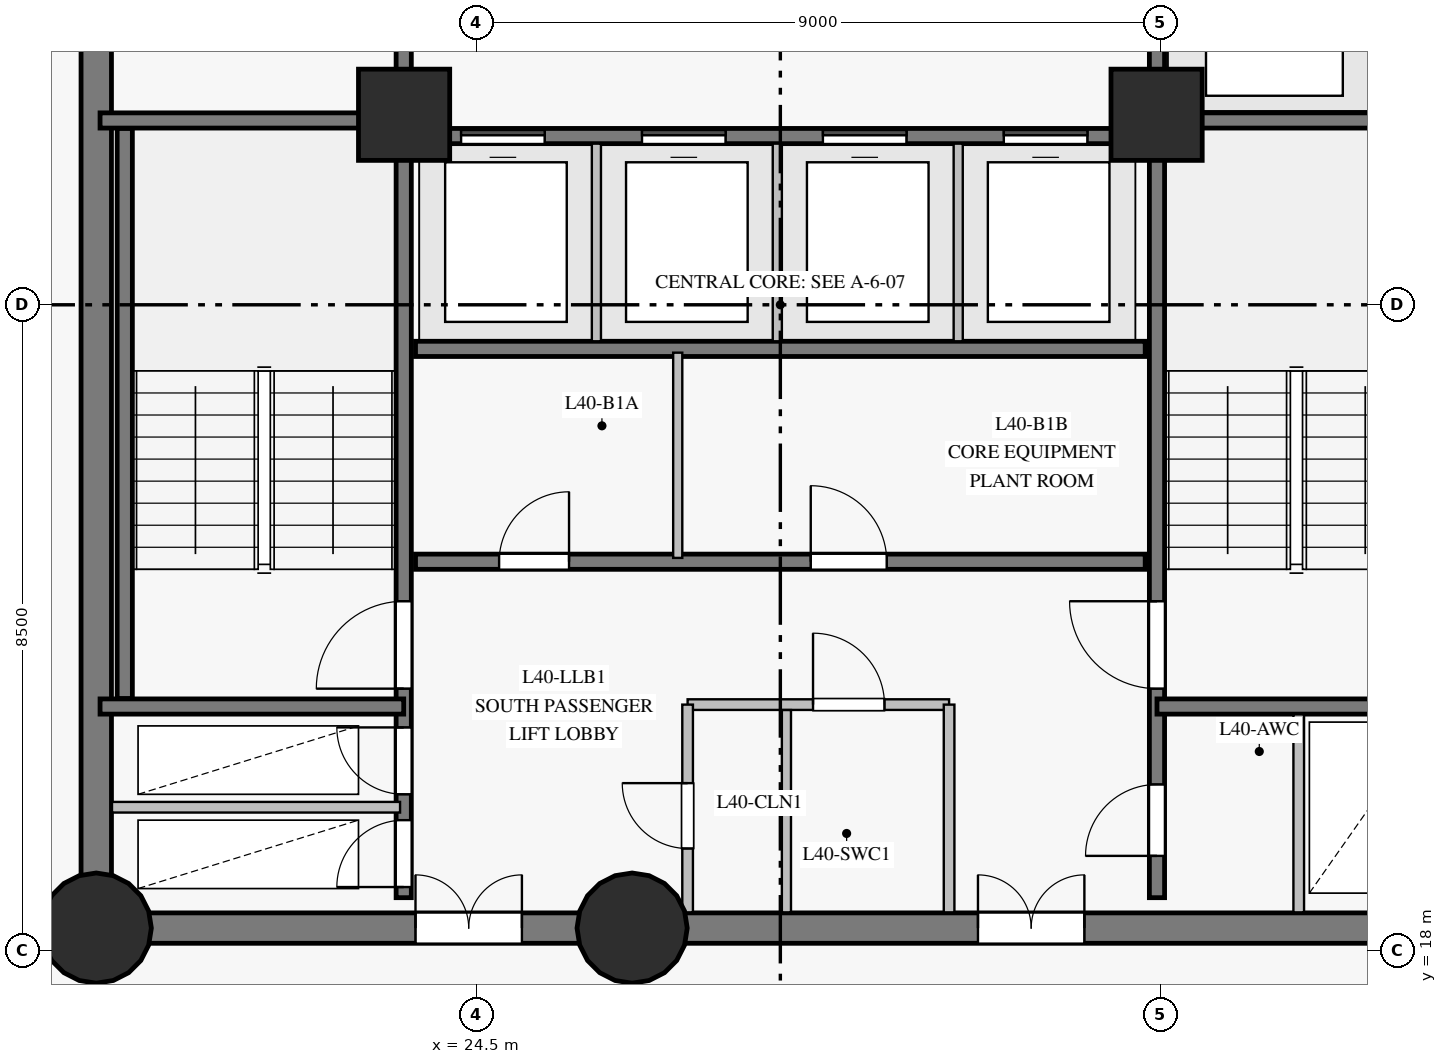
"""IFC4 building model, lengths in metres.
Left out: names, types, materials, properties, quantities, classifications, styles, units other than length and angle.
Written with IfcOpenShell. Run it as: python <this file> out.ifc"""

import sys

from ifc_helpers import new_model, si_unit, direction, frame, frame_2d, origin, origin_with_axes, origin_2d, place, context, subcontext, project, spatial, rectangle, circle, extrude, source, transform, mapped, element, fill, save


model = new_model("IFC4")
c1 = context("Model", 3, precision=1e-05, world=origin(), true_north=direction((0.0, 1.0)))
c2 = subcontext(c1, "Body", "Model", "MODEL_VIEW")
j1 = project(units=[si_unit("LENGTHUNIT", "METRE"), si_unit("PLANEANGLEUNIT", "RADIAN")], contexts=[c1])
p1 = place(None, origin())
s1 = spatial("IfcSite", under=j1, at=p1, CompositionType="ELEMENT")
p2 = place(p1, origin())
s2 = spatial("IfcBuilding", under=s1, at=p2, CompositionType="ELEMENT")
p3 = place(p2, frame((0.0, 0.0, 141.95)))
s3 = spatial("IfcBuildingStorey", under=s2, at=p3, CompositionType="ELEMENT", Elevation=141.95)
p4 = place(p3, frame((19.5, 18.3, 0.0), z_axis=(0.0, 0.0, 1.0), x_axis=(1.0, 0.0, 0.0)))
e1 = element("IfcWall", 1, at=p4, inside=s3, PredefinedType="SHEAR", context=c2, shape_type="SweptSolid", body=[
    extrude(rectangle(XDim=7.05, YDim=0.4, at=frame_2d((3.525, 0.0))), origin(), (0.0, 0.0, 1.0), 2.825),
])
p5 = place(p4, frame((4.2, 0.0, 0.0)))
e2 = element("IfcOpeningElement", 2, at=p5, cuts=e1, PredefinedType="OPENING", context=c2, shape_type="SweptSolid", body=[
    extrude(rectangle(XDim=1.4, YDim=2.2, at=frame_2d((0.7, 1.1))), frame((0.0, 0.21, 0.0), z_axis=(0.0, -1.0, 0.0), x_axis=(1.0, 0.0, 0.0)), (0.0, 0.0, 1.0), 0.42),
])
p6 = place(p3, frame((26.55, 18.3, 0.0), z_axis=(0.0, 0.0, 1.0), x_axis=(1.0, 0.0, 0.0)))
e3 = element("IfcWall", 3, at=p6, inside=s3, PredefinedType="SHEAR", context=c2, shape_type="SweptSolid", body=[
    extrude(rectangle(XDim=10.95, YDim=0.4, at=frame_2d((5.475, 0.0))), origin(), (0.0, 0.0, 1.0), 2.825),
])
p7 = place(p6, frame((4.55, 0.0, 0.0)))
e4 = element("IfcOpeningElement", 4, at=p7, cuts=e3, PredefinedType="OPENING", context=c2, shape_type="SweptSolid", body=[
    extrude(rectangle(XDim=1.4, YDim=2.2, at=frame_2d((0.7, 1.1))), frame((0.0, 0.21, 0.0), z_axis=(0.0, -1.0, 0.0), x_axis=(1.0, 0.0, 0.0)), (0.0, 0.0, 1.0), 0.42),
])
p8 = place(p3, frame((19.5, 34.7, 0.0), z_axis=(0.0, 0.0, 1.0), x_axis=(0.0, -1.0, 0.0)))
e5 = element("IfcWall", 5, at=p8, inside=s3, PredefinedType="SHEAR", context=c2, shape_type="SweptSolid", body=[
    extrude(rectangle(XDim=16.4, YDim=0.4, at=frame_2d((8.2, 0.0))), origin(), (0.0, 0.0, 1.0), 2.825),
])
p9 = place(p8, frame((3.1, 0.0, 0.0)))
e6 = element("IfcOpeningElement", 6, at=p9, cuts=e5, PredefinedType="OPENING", context=c2, shape_type="SweptSolid", body=[
    extrude(rectangle(XDim=1.1, YDim=2.15, at=frame_2d((0.55, 1.075))), frame((0.0, 0.21, 0.0), z_axis=(0.0, -1.0, 0.0), x_axis=(1.0, 0.0, 0.0)), (0.0, 0.0, 1.0), 0.42),
])
m1 = source(origin_with_axes(), c2, "Body", "SweptSolid", [
    extrude(circle(Radius=0.725, at=origin_2d()), origin(), (0.0, 0.0, 1.0), 3.05),
])
for number, where, z_axis, x_axis in (
    (7, (19.5, 18.3, 0.0), (0.0, 0.0, 1.0), (1.0, 0.0, 0.0)),
    (8, (26.55, 18.3, 0.0), (0.0, 0.0, 1.0), (1.0, 0.0, 0.0)),
):
    element("IfcColumn", number, at=place(p3, frame(where, z_axis=z_axis, x_axis=x_axis)), inside=s3, PredefinedType="COLUMN", context=c2, shape_type="MappedRepresentation", body=[
        mapped(m1, transform((0.0, 0.0, 0.0), scale=1.0)),
    ])
m2 = source(origin_with_axes(), c2, "Body", "SweptSolid", [
    extrude(rectangle(XDim=1.2, YDim=1.2, at=origin_2d()), origin(), (0.0, 0.0, 1.0), 3.05),
])
for number, where, z_axis, x_axis in (
    (9, (23.55, 29.0, 0.0), (0.0, 0.0, 1.0), (1.0, 0.0, 0.0)),
    (10, (33.45, 29.0, 0.0), (0.0, 0.0, 1.0), (1.0, 0.0, 0.0)),
):
    element("IfcColumn", number, at=place(p3, frame(where, z_axis=z_axis, x_axis=x_axis)), inside=s3, PredefinedType="COLUMN", context=c2, shape_type="MappedRepresentation", body=[
        mapped(m2, transform((0.0, 0.0, 0.0), scale=1.0)),
    ])
p10 = place(p3, frame((23.545, 18.7, 0.0), z_axis=(0.0, 0.0, 1.0), x_axis=(0.0, 1.0, 0.0)))
e11 = element("IfcWall", 11, at=p10, inside=s3, PredefinedType="SHEAR", context=c2, shape_type="SweptSolid", body=[
    extrude(rectangle(XDim=15.6, YDim=0.2, at=frame_2d((7.8, 0.0))), origin(), (0.0, 0.0, 1.0), 2.825),
])
p11 = place(p10, frame((2.75, 0.0, 0.0)))
e12 = element("IfcOpeningElement", 12, at=p11, cuts=e11, PredefinedType="OPENING", context=c2, shape_type="SweptSolid", body=[
    extrude(rectangle(XDim=1.15, YDim=2.15, at=frame_2d((0.575, 1.075))), frame((0.0, 0.11, 0.0), z_axis=(0.0, -1.0, 0.0), x_axis=(1.0, 0.0, 0.0)), (0.0, 0.0, 1.0), 0.22),
])
p12 = place(p10, frame((0.14, 0.0, 0.0)))
e13 = element("IfcOpeningElement", 13, at=p12, cuts=e11, PredefinedType="OPENING", context=c2, shape_type="SweptSolid", body=[
    extrude(rectangle(XDim=0.88, YDim=2.1, at=frame_2d((0.44, 1.05))), frame((0.0, 0.11, 0.0), z_axis=(0.0, -1.0, 0.0), x_axis=(1.0, 0.0, 0.0)), (0.0, 0.0, 1.0), 0.22),
])
p13 = place(p10, frame((1.36, 0.0, 0.0)))
e14 = element("IfcOpeningElement", 14, at=p13, cuts=e11, PredefinedType="OPENING", context=c2, shape_type="SweptSolid", body=[
    extrude(rectangle(XDim=0.88, YDim=2.1, at=frame_2d((0.44, 1.05))), frame((0.0, 0.11, 0.0), z_axis=(0.0, -1.0, 0.0), x_axis=(1.0, 0.0, 0.0)), (0.0, 0.0, 1.0), 0.22),
])
p14 = place(p10, frame((12.1, 0.0, 0.0)))
e15 = element("IfcOpeningElement", 15, at=p14, cuts=e11, PredefinedType="OPENING", context=c2, shape_type="SweptSolid", body=[
    extrude(rectangle(XDim=1.12, YDim=2.15, at=frame_2d((0.56, 1.075))), frame((0.0, 0.11, 0.0), z_axis=(0.0, -1.0, 0.0), x_axis=(1.0, 0.0, 0.0)), (0.0, 0.0, 1.0), 0.22),
])
p15 = place(p10, frame((14.05, 0.0, 0.0)))
e16 = element("IfcOpeningElement", 16, at=p15, cuts=e11, PredefinedType="OPENING", context=c2, shape_type="SweptSolid", body=[
    extrude(rectangle(XDim=1.12, YDim=2.15, at=frame_2d((0.56, 1.075))), frame((0.0, 0.11, 0.0), z_axis=(0.0, -1.0, 0.0), x_axis=(1.0, 0.0, 0.0)), (0.0, 0.0, 1.0), 0.22),
])
p16 = place(p3, frame((33.455, 18.7, 0.0), z_axis=(0.0, 0.0, 1.0), x_axis=(0.0, 1.0, 0.0)))
e17 = element("IfcWall", 17, at=p16, inside=s3, PredefinedType="SHEAR", context=c2, shape_type="SweptSolid", body=[
    extrude(rectangle(XDim=15.6, YDim=0.2, at=frame_2d((7.8, 0.0))), origin(), (0.0, 0.0, 1.0), 2.825),
])
p17 = place(p16, frame((2.75, 0.0, 0.0)))
e18 = element("IfcOpeningElement", 18, at=p17, cuts=e17, PredefinedType="OPENING", context=c2, shape_type="SweptSolid", body=[
    extrude(rectangle(XDim=1.15, YDim=2.15, at=frame_2d((0.575, 1.075))), frame((0.0, 0.11, 0.0), z_axis=(0.0, -1.0, 0.0), x_axis=(1.0, 0.0, 0.0)), (0.0, 0.0, 1.0), 0.22),
])
p18 = place(p16, frame((0.55, 0.0, 0.0)))
e19 = element("IfcOpeningElement", 19, at=p18, cuts=e17, PredefinedType="OPENING", context=c2, shape_type="SweptSolid", body=[
    extrude(rectangle(XDim=0.94, YDim=2.1, at=frame_2d((0.47, 1.05))), frame((0.0, 0.11, 0.0), z_axis=(0.0, -1.0, 0.0), x_axis=(1.0, 0.0, 0.0)), (0.0, 0.0, 1.0), 0.22),
])
p19 = place(p3, frame((23.7, 23.12, 0.0), z_axis=(0.0, 0.0, 1.0), x_axis=(1.0, 0.0, 0.0)))
e20 = element("IfcWall", 20, at=p19, inside=s3, PredefinedType="SHEAR", context=c2, shape_type="SweptSolid", body=[
    extrude(rectangle(XDim=9.6, YDim=0.2, at=frame_2d((4.8, 0.0))), origin(), (0.0, 0.0, 1.0), 2.825),
])
p20 = place(p19, frame((1.1, 0.0, 0.0)))
e21 = element("IfcOpeningElement", 21, at=p20, cuts=e20, PredefinedType="OPENING", context=c2, shape_type="SweptSolid", body=[
    extrude(rectangle(XDim=0.92, YDim=2.1, at=frame_2d((0.46, 1.05))), frame((0.0, 0.11, 0.0), z_axis=(0.0, -1.0, 0.0), x_axis=(1.0, 0.0, 0.0)), (0.0, 0.0, 1.0), 0.22),
])
p21 = place(p19, frame((5.2, 0.0, 0.0)))
e22 = element("IfcOpeningElement", 22, at=p21, cuts=e20, PredefinedType="OPENING", context=c2, shape_type="SweptSolid", body=[
    extrude(rectangle(XDim=1.0, YDim=2.15, at=frame_2d((0.5, 1.075))), frame((0.0, 0.11, 0.0), z_axis=(0.0, -1.0, 0.0), x_axis=(1.0, 0.0, 0.0)), (0.0, 0.0, 1.0), 0.22),
])
p22 = place(p3, frame((23.7, 25.92, 0.0), z_axis=(0.0, 0.0, 1.0), x_axis=(1.0, 0.0, 0.0)))
e23 = element("IfcWall", 23, at=p22, inside=s3, PredefinedType="SHEAR", context=c2, shape_type="SweptSolid", body=[
    extrude(rectangle(XDim=9.6, YDim=0.2, at=frame_2d((4.8, 0.0))), origin(), (0.0, 0.0, 1.0), 2.825),
])
p23 = place(p3, frame((23.7, 28.72, 0.0), z_axis=(0.0, 0.0, 1.0), x_axis=(1.0, 0.0, 0.0)))
e24 = element("IfcWall", 24, at=p23, inside=s3, PredefinedType="SHEAR", context=c2, shape_type="SweptSolid", body=[
    extrude(rectangle(XDim=9.6, YDim=0.2, at=frame_2d((4.8, 0.0))), origin(), (0.0, 0.0, 1.0), 2.825),
])
p24 = place(p23, frame((0.6, 0.0, 0.0)))
e25 = element("IfcOpeningElement", 25, at=p24, cuts=e24, PredefinedType="OPENING", context=c2, shape_type="SweptSolid", body=[
    extrude(rectangle(XDim=1.1, YDim=2.15, at=frame_2d((0.55, 1.075))), frame((0.0, 0.11, 0.0), z_axis=(0.0, -1.0, 0.0), x_axis=(1.0, 0.0, 0.0)), (0.0, 0.0, 1.0), 0.22),
])
p25 = place(p23, frame((2.98, 0.0, 0.0)))
e26 = element("IfcOpeningElement", 26, at=p25, cuts=e24, PredefinedType="OPENING", context=c2, shape_type="SweptSolid", body=[
    extrude(rectangle(XDim=1.1, YDim=2.15, at=frame_2d((0.55, 1.075))), frame((0.0, 0.11, 0.0), z_axis=(0.0, -1.0, 0.0), x_axis=(1.0, 0.0, 0.0)), (0.0, 0.0, 1.0), 0.22),
])
p26 = place(p23, frame((5.36, 0.0, 0.0)))
e27 = element("IfcOpeningElement", 27, at=p26, cuts=e24, PredefinedType="OPENING", context=c2, shape_type="SweptSolid", body=[
    extrude(rectangle(XDim=1.1, YDim=2.15, at=frame_2d((0.55, 1.075))), frame((0.0, 0.11, 0.0), z_axis=(0.0, -1.0, 0.0), x_axis=(1.0, 0.0, 0.0)), (0.0, 0.0, 1.0), 0.22),
])
p27 = place(p23, frame((7.74, 0.0, 0.0)))
e28 = element("IfcOpeningElement", 28, at=p27, cuts=e24, PredefinedType="OPENING", context=c2, shape_type="SweptSolid", body=[
    extrude(rectangle(XDim=1.1, YDim=2.15, at=frame_2d((0.55, 1.075))), frame((0.0, 0.11, 0.0), z_axis=(0.0, -1.0, 0.0), x_axis=(1.0, 0.0, 0.0)), (0.0, 0.0, 1.0), 0.22),
])
p28 = place(p3, frame((19.875, 21.32, 0.0), z_axis=(0.0, 0.0, 1.0), x_axis=(0.0, 1.0, 0.0)))
e29 = element("IfcWall", 29, at=p28, inside=s3, PredefinedType="SHEAR", context=c2, shape_type="SweptSolid", body=[
    extrude(rectangle(XDim=7.5, YDim=0.2, at=frame_2d((3.75, 0.0))), origin(), (0.0, 0.0, 1.0), 2.825),
])
for number, where, z_axis, x_axis in (
    (30, (33.455, 21.215, 0.0), (0.0, 0.0, 1.0), (1.0, 0.0, 0.0)),
    (31, (33.455, 28.925, 0.0), (0.0, 0.0, 1.0), (1.0, 0.0, 0.0)),
    (32, (19.55, 21.215, 0.0), (0.0, 0.0, 1.0), (1.0, 0.0, 0.0)),
    (33, (19.55, 28.925, 0.0), (0.0, 0.0, 1.0), (1.0, 0.0, 0.0)),
):
    element("IfcWall", number, at=place(p3, frame(where, z_axis=z_axis, x_axis=x_axis)), inside=s3, PredefinedType="SHEAR", context=c2, shape_type="SweptSolid", body=[
        extrude(rectangle(XDim=3.995, YDim=0.2, at=frame_2d((1.998, 0.0))), origin(), (0.0, 0.0, 1.0), 2.825),
    ])
p29 = place(p3, frame((19.707, 19.89, 0.0), z_axis=(0.0, 0.0, 1.0), x_axis=(1.0, 0.0, 0.0)))
e34 = element("IfcWall", 34, at=p29, inside=s3, PredefinedType="PARTITIONING", context=c2, shape_type="SweptSolid", body=[
    extrude(rectangle(XDim=3.79, YDim=0.14, at=frame_2d((1.895, 0.0))), origin(), (0.0, 0.0, 1.0), 2.825),
])
p30 = place(p3, frame((27.28, 21.24, 0.0), z_axis=(0.0, 0.0, 1.0), x_axis=(1.0, 0.0, 0.0)))
e35 = element("IfcWall", 35, at=p30, inside=s3, PredefinedType="PARTITIONING", context=c2, shape_type="SweptSolid", body=[
    extrude(rectangle(XDim=3.44, YDim=0.14, at=frame_2d((1.72, 0.0))), origin(), (0.0, 0.0, 1.0), 2.825),
])
p31 = place(p30, frame((1.65, 0.0, 0.0)))
e36 = element("IfcOpeningElement", 36, at=p31, cuts=e35, PredefinedType="OPENING", context=c2, shape_type="SweptSolid", body=[
    extrude(rectangle(XDim=0.94, YDim=2.1, at=frame_2d((0.47, 1.05))), frame((0.0, 0.08, 0.0), z_axis=(0.0, -1.0, 0.0), x_axis=(1.0, 0.0, 0.0)), (0.0, 0.0, 1.0), 0.16),
])
p32 = place(p3, frame((27.15, 23.17, 0.0), z_axis=(0.0, 0.0, 1.0), x_axis=(0.0, 1.0, 0.0)))
e37 = element("IfcWall", 37, at=p32, inside=s3, PredefinedType="PARTITIONING", context=c2, shape_type="SweptSolid", body=[
    extrude(rectangle(XDim=2.7, YDim=0.12, at=frame_2d((1.35, 0.0))), origin(), (0.0, 0.0, 1.0), 2.825),
])
p33 = place(p3, frame((27.28, 18.507, 0.0), z_axis=(0.0, 0.0, 1.0), x_axis=(0.0, 1.0, 0.0)))
e38 = element("IfcWall", 38, at=p33, inside=s3, PredefinedType="PARTITIONING", context=c2, shape_type="SweptSolid", body=[
    extrude(rectangle(XDim=2.733, YDim=0.14, at=frame_2d((1.366, 0.0))), origin(), (0.0, 0.0, 1.0), 2.825),
])
p34 = place(p33, frame((0.84, 0.0, 0.0)))
e39 = element("IfcOpeningElement", 39, at=p34, cuts=e38, PredefinedType="OPENING", context=c2, shape_type="SweptSolid", body=[
    extrude(rectangle(XDim=0.86, YDim=2.1, at=frame_2d((0.43, 1.05))), frame((0.0, 0.08, 0.0), z_axis=(0.0, -1.0, 0.0), x_axis=(1.0, 0.0, 0.0)), (0.0, 0.0, 1.0), 0.16),
])
p35 = place(p3, frame((30.72, 18.507, 0.0), z_axis=(0.0, 0.0, 1.0), x_axis=(0.0, 1.0, 0.0)))
e40 = element("IfcWall", 40, at=p35, inside=s3, PredefinedType="PARTITIONING", context=c2, shape_type="SweptSolid", body=[
    extrude(rectangle(XDim=2.733, YDim=0.14, at=frame_2d((1.366, 0.0))), origin(), (0.0, 0.0, 1.0), 2.825),
])
for number, where, z_axis, x_axis in (
    (41, (26.08, 26.02, 0.0), (0.0, 0.0, 1.0), (0.0, 1.0, 0.0)),
    (42, (28.46, 26.02, 0.0), (0.0, 0.0, 1.0), (0.0, 1.0, 0.0)),
    (43, (30.84, 26.02, 0.0), (0.0, 0.0, 1.0), (0.0, 1.0, 0.0)),
):
    element("IfcWall", number, at=place(p3, frame(where, z_axis=z_axis, x_axis=x_axis)), inside=s3, PredefinedType="PARTITIONING", context=c2, shape_type="SweptSolid", body=[
        extrude(rectangle(XDim=2.6, YDim=0.12, at=frame_2d((1.3, 0.0))), origin(), (0.0, 0.0, 1.0), 2.825),
    ])
p36 = place(p3, frame((28.58, 18.507, 0.0), z_axis=(0.0, 0.0, 1.0), x_axis=(0.0, 1.0, 0.0)))
e44 = element("IfcWall", 44, at=p36, inside=s3, PredefinedType="PARTITIONING", context=c2, shape_type="SweptSolid", body=[
    extrude(rectangle(XDim=2.662, YDim=0.12, at=frame_2d((1.331, 0.0))), origin(), (0.0, 0.0, 1.0), 2.825),
])
p37 = place(p3, frame((35.32, 18.507, 0.0), z_axis=(0.0, 0.0, 1.0), x_axis=(0.0, 1.0, 0.0)))
e45 = element("IfcWall", 45, at=p37, inside=s3, PredefinedType="PARTITIONING", context=c2, shape_type="SweptSolid", body=[
    extrude(rectangle(XDim=2.604, YDim=0.14, at=frame_2d((1.302, 0.0))), origin(), (0.0, 0.0, 1.0), 2.825),
])
m3 = source(origin_with_axes(), c2, "Body", "SweptSolid", [
    extrude(rectangle(XDim=1.15, YDim=2.15, at=frame_2d((0.575, 1.075))), frame((0.0, 0.025, 0.0), z_axis=(0.0, -1.0, 0.0), x_axis=(1.0, 0.0, 0.0)), (0.0, 0.0, 1.0), 0.05),
])
p38 = place(p11, origin())
e46 = element("IfcDoor", 46, at=p38, inside=s3, OperationType="SINGLE_SWING_LEFT", PredefinedType="DOOR", context=c2, shape_type="MappedRepresentation", body=[
    mapped(m3, transform((0.0, 0.0, 0.0), scale=1.0)),
])
fill(e12, e46)
p39 = place(p17, origin())
e47 = element("IfcDoor", 47, at=p39, inside=s3, OperationType="SINGLE_SWING_RIGHT", PredefinedType="DOOR", context=c2, shape_type="MappedRepresentation", body=[
    mapped(m3, transform((0.0, 0.0, 0.0), scale=1.0)),
])
fill(e18, e47)
m4 = source(origin_with_axes(), c2, "Body", "SweptSolid", [
    extrude(rectangle(XDim=0.88, YDim=2.1, at=frame_2d((0.44, 1.05))), frame((0.0, 0.025, 0.0), z_axis=(0.0, -1.0, 0.0), x_axis=(1.0, 0.0, 0.0)), (0.0, 0.0, 1.0), 0.05),
])
p40 = place(p12, origin())
e48 = element("IfcDoor", 48, at=p40, inside=s3, OperationType="SINGLE_SWING_LEFT", PredefinedType="DOOR", context=c2, shape_type="MappedRepresentation", body=[
    mapped(m4, transform((0.0, 0.0, 0.0), scale=1.0)),
])
fill(e13, e48)
p41 = place(p13, origin())
e49 = element("IfcDoor", 49, at=p41, inside=s3, OperationType="SINGLE_SWING_RIGHT", PredefinedType="DOOR", context=c2, shape_type="MappedRepresentation", body=[
    mapped(m4, transform((0.0, 0.0, 0.0), scale=1.0)),
])
fill(e14, e49)
m5 = source(origin_with_axes(), c2, "Body", "SweptSolid", [
    extrude(rectangle(XDim=1.4, YDim=2.2, at=frame_2d((0.7, 1.1))), frame((0.0, 0.025, 0.0), z_axis=(0.0, -1.0, 0.0), x_axis=(1.0, 0.0, 0.0)), (0.0, 0.0, 1.0), 0.05),
])
p42 = place(p5, origin())
e50 = element("IfcDoor", 50, at=p42, inside=s3, OperationType="DOUBLE_DOOR_SINGLE_SWING", PredefinedType="DOOR", context=c2, shape_type="MappedRepresentation", body=[
    mapped(m5, transform((0.0, 0.0, 0.0), scale=1.0)),
])
fill(e2, e50)
p43 = place(p7, origin())
e51 = element("IfcDoor", 51, at=p43, inside=s3, OperationType="DOUBLE_DOOR_SINGLE_SWING", PredefinedType="DOOR", context=c2, shape_type="MappedRepresentation", body=[
    mapped(m5, transform((0.0, 0.0, 0.0), scale=1.0)),
])
fill(e4, e51)
m6 = source(origin_with_axes(), c2, "Body", "SweptSolid", [
    extrude(rectangle(XDim=0.94, YDim=2.1, at=frame_2d((0.47, 1.05))), frame((0.0, 0.025, 0.0), z_axis=(0.0, -1.0, 0.0), x_axis=(1.0, 0.0, 0.0)), (0.0, 0.0, 1.0), 0.05),
])
p44 = place(p18, origin())
e52 = element("IfcDoor", 52, at=p44, inside=s3, OperationType="SINGLE_SWING_LEFT", PredefinedType="DOOR", context=c2, shape_type="MappedRepresentation", body=[
    mapped(m6, transform((0.0, 0.0, 0.0), scale=1.0)),
])
fill(e19, e52)
m7 = source(origin_with_axes(), c2, "Body", "SweptSolid", [
    extrude(rectangle(XDim=0.86, YDim=2.1, at=frame_2d((0.43, 1.05))), frame((0.0, 0.025, 0.0), z_axis=(0.0, -1.0, 0.0), x_axis=(1.0, 0.0, 0.0)), (0.0, 0.0, 1.0), 0.05),
])
p45 = place(p34, origin())
e53 = element("IfcDoor", 53, at=p45, inside=s3, OperationType="SINGLE_SWING_RIGHT", PredefinedType="DOOR", context=c2, shape_type="MappedRepresentation", body=[
    mapped(m7, transform((0.0, 0.0, 0.0), scale=1.0)),
])
fill(e39, e53)
p46 = place(p31, origin())
e54 = element("IfcDoor", 54, at=p46, inside=s3, OperationType="SINGLE_SWING_LEFT", PredefinedType="DOOR", context=c2, shape_type="MappedRepresentation", body=[
    mapped(m6, transform((0.0, 0.0, 0.0), scale=1.0)),
])
fill(e36, e54)
m8 = source(origin_with_axes(), c2, "Body", "SweptSolid", [
    extrude(rectangle(XDim=0.92, YDim=2.1, at=frame_2d((0.46, 1.05))), frame((0.0, 0.025, 0.0), z_axis=(0.0, -1.0, 0.0), x_axis=(1.0, 0.0, 0.0)), (0.0, 0.0, 1.0), 0.05),
])
p47 = place(p20, origin())
e55 = element("IfcDoor", 55, at=p47, inside=s3, OperationType="SINGLE_SWING_RIGHT", PredefinedType="DOOR", context=c2, shape_type="MappedRepresentation", body=[
    mapped(m8, transform((0.0, 0.0, 0.0), scale=1.0)),
])
fill(e21, e55)
m9 = source(origin_with_axes(), c2, "Body", "SweptSolid", [
    extrude(rectangle(XDim=1.0, YDim=2.15, at=frame_2d((0.5, 1.075))), frame((0.0, 0.025, 0.0), z_axis=(0.0, -1.0, 0.0), x_axis=(1.0, 0.0, 0.0)), (0.0, 0.0, 1.0), 0.05),
])
p48 = place(p21, origin())
e56 = element("IfcDoor", 56, at=p48, inside=s3, OperationType="SINGLE_SWING_LEFT", PredefinedType="DOOR", context=c2, shape_type="MappedRepresentation", body=[
    mapped(m9, transform((0.0, 0.0, 0.0), scale=1.0)),
])
fill(e22, e56)
m10 = source(origin_with_axes(), c2, "Body", "SweptSolid", [
    extrude(rectangle(XDim=1.1, YDim=2.15, at=frame_2d((0.55, 1.075))), frame((0.0, 0.025, 0.0), z_axis=(0.0, -1.0, 0.0), x_axis=(1.0, 0.0, 0.0)), (0.0, 0.0, 1.0), 0.05),
])
p49 = place(p24, origin())
e57 = element("IfcDoor", 57, at=p49, inside=s3, OperationType="SLIDING_TO_LEFT", PredefinedType="DOOR", context=c2, shape_type="MappedRepresentation", body=[
    mapped(m10, transform((0.0, 0.0, 0.0), scale=1.0)),
])
fill(e25, e57)
p50 = place(p25, origin())
e58 = element("IfcDoor", 58, at=p50, inside=s3, OperationType="SLIDING_TO_RIGHT", PredefinedType="DOOR", context=c2, shape_type="MappedRepresentation", body=[
    mapped(m10, transform((0.0, 0.0, 0.0), scale=1.0)),
])
fill(e26, e58)
p51 = place(p26, origin())
e59 = element("IfcDoor", 59, at=p51, inside=s3, OperationType="SLIDING_TO_LEFT", PredefinedType="DOOR", context=c2, shape_type="MappedRepresentation", body=[
    mapped(m10, transform((0.0, 0.0, 0.0), scale=1.0)),
])
fill(e27, e59)
p52 = place(p27, origin())
e60 = element("IfcDoor", 60, at=p52, inside=s3, OperationType="SLIDING_TO_RIGHT", PredefinedType="DOOR", context=c2, shape_type="MappedRepresentation", body=[
    mapped(m10, transform((0.0, 0.0, 0.0), scale=1.0)),
])
fill(e28, e60)
save(model, sys.argv[1])
